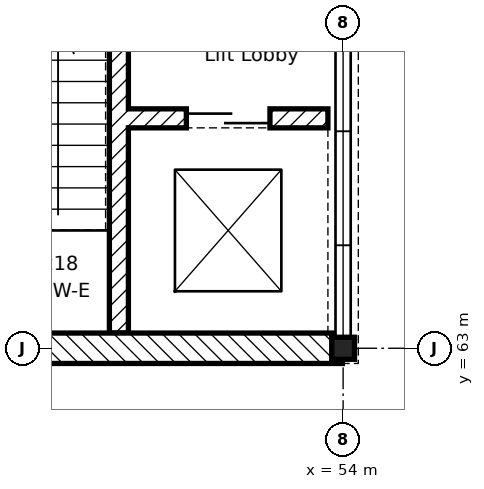
"""IFC4 building model, lengths in metres.
Left out: names, types, materials, properties, quantities, classifications, styles, units other than length and angle.
Written with IfcOpenShell. Run it as: python <this file> out.ifc"""

import sys

from ifc_helpers import new_model, si_unit, direction, frame, frame_2d, origin, origin_2d, place, context, subcontext, project, spatial, rectangle, i_section, extrude, element, fill, save


model = new_model("IFC4")
c1 = context("Model", 3, precision=1e-05, world=origin(), true_north=direction((0.0, 1.0)))
c2 = subcontext(c1, "Body", "Model", "MODEL_VIEW")
j1 = project(units=[si_unit("LENGTHUNIT", "METRE"), si_unit("PLANEANGLEUNIT", "RADIAN")], contexts=[c1])
p1 = place(None, origin())
s1 = spatial("IfcSite", under=j1, at=p1, CompositionType="ELEMENT")
p2 = place(p1, origin())
s2 = spatial("IfcBuilding", under=s1, at=p2, CompositionType="ELEMENT")
p3 = place(p2, frame((0.0, 0.0, 5.4)))
s3 = spatial("IfcBuildingStorey", under=s2, at=p3, CompositionType="ELEMENT", Elevation=5.4)
p4 = place(p3, frame((54.0, 63.0, -0.2), z_axis=(0.0, 0.0, 1.0), x_axis=(1.0, 0.0, 0.0)))
e1 = element("IfcColumn", 1, at=p4, inside=s3, PredefinedType="COLUMN", context=c2, shape_type="SweptSolid", body=[
    extrude(i_section(OverallWidth=0.3, OverallDepth=0.29, WebThickness=0.009, FlangeThickness=0.014, FilletRadius=0.027, at=origin_2d()), origin(), (0.0, 0.0, 1.0), 4.5),
])
p5 = place(p3, frame((51.05, 63.2, 0.0), z_axis=(0.0, 0.0, 1.0), x_axis=(0.0, 1.0, 0.0)))
e2 = element("IfcWall", 2, at=p5, inside=s3, PredefinedType="SHEAR", context=c2, shape_type="SweptSolid", body=[
    extrude(rectangle(XDim=7.225, YDim=0.25, at=frame_2d((3.613, 0.0))), origin(), (0.0, 0.0, 1.0), 4.3),
])
p6 = place(p3, frame((51.175, 66.025, 0.0), z_axis=(0.0, 0.0, 1.0), x_axis=(1.0, 0.0, 0.0)))
e3 = element("IfcWall", 3, at=p6, inside=s3, PredefinedType="SHEAR", context=c2, shape_type="SweptSolid", body=[
    extrude(rectangle(XDim=2.625, YDim=0.25, at=frame_2d((1.312, 0.0))), origin(), (0.0, 0.0, 1.0), 4.3),
])
p7 = place(p6, frame((0.762, 0.0, 0.0)))
e4 = element("IfcOpeningElement", 4, at=p7, cuts=e3, PredefinedType="OPENING", context=c2, shape_type="SweptSolid", body=[
    extrude(rectangle(XDim=1.1, YDim=2.1, at=frame_2d((0.55, 1.05))), frame((0.0, 0.135, 0.0), z_axis=(0.0, -1.0, 0.0), x_axis=(1.0, 0.0, 0.0)), (0.0, 0.0, 1.0), 0.27),
])
p8 = place(p3, frame((53.991, 63.0, 0.0), z_axis=(0.0, 0.0, 1.0), x_axis=(-1.0, 0.0, 0.0)))
e5 = element("IfcWall", 5, at=p8, inside=s3, PredefinedType="STANDARD", context=c2, shape_type="SweptSolid", body=[
    extrude(rectangle(XDim=8.981, YDim=0.4, at=frame_2d((4.491, 0.0))), origin(), (0.0, 0.0, 1.0), 3.9),
])
p9 = place(p8, frame((6.891, 0.0, 0.9)))
e6 = element("IfcOpeningElement", 6, at=p9, cuts=e5, PredefinedType="OPENING", context=c2, shape_type="SweptSolid", body=[
    extrude(rectangle(XDim=1.2, YDim=2.4, at=frame_2d((0.6, 1.2))), frame((0.0, 0.21, 0.0), z_axis=(0.0, -1.0, 0.0), x_axis=(1.0, 0.0, 0.0)), (0.0, 0.0, 1.0), 0.42),
])
p10 = place(p8, frame((3.891, 0.0, 0.9)))
e7 = element("IfcOpeningElement", 7, at=p10, cuts=e5, PredefinedType="OPENING", context=c2, shape_type="SweptSolid", body=[
    extrude(rectangle(XDim=1.2, YDim=2.7, at=frame_2d((0.6, 1.35))), frame((0.0, 0.21, 0.0), z_axis=(0.0, -1.0, 0.0), x_axis=(1.0, 0.0, 0.0)), (0.0, 0.0, 1.0), 0.42),
])
p11 = place(p7, origin())
e8 = element("IfcDoor", 8, at=p11, inside=s3, OperationType="SLIDING_TO_LEFT", PredefinedType="DOOR", context=c2, shape_type="SweptSolid", body=[
    extrude(rectangle(XDim=1.1, YDim=2.1, at=frame_2d((0.55, 1.05))), frame((0.0, 0.025, 0.0), z_axis=(0.0, -1.0, 0.0), x_axis=(1.0, 0.0, 0.0)), (0.0, 0.0, 1.0), 0.05),
])
fill(e4, e8)
save(model, sys.argv[1])
